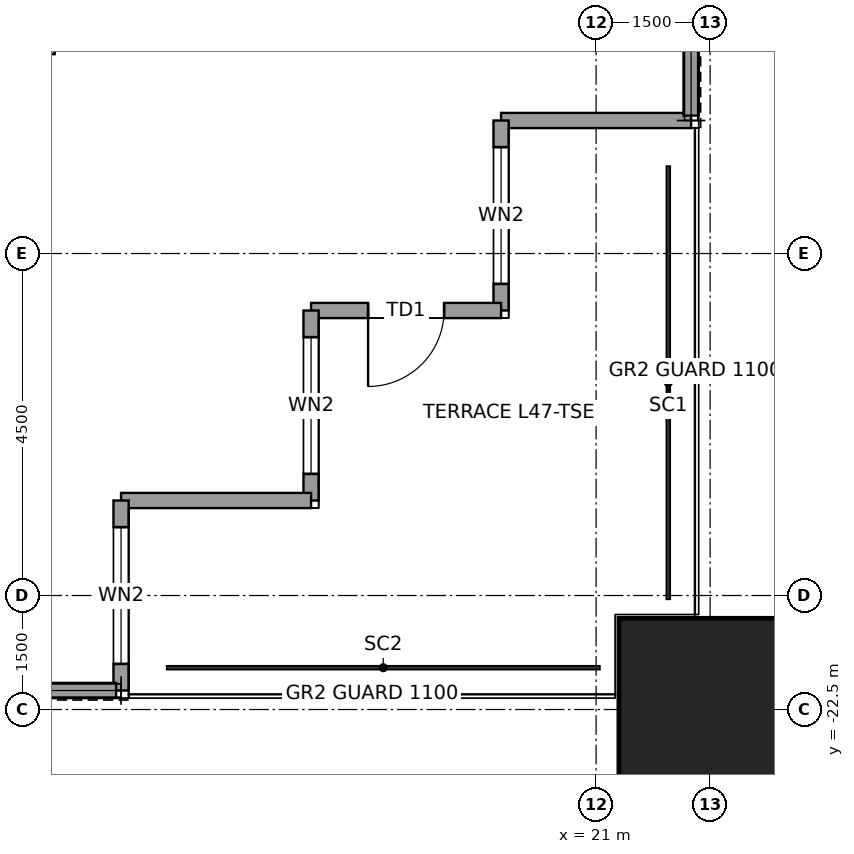
"""IFC4 building model, lengths in metres.
Left out: names, types, materials, properties, quantities, classifications, styles, units other than length and angle.
Written with IfcOpenShell. Run it as: python <this file> out.ifc"""

import sys

from ifc_helpers import new_model, si_unit, direction, frame, frame_2d, origin, origin_2d, place, context, subcontext, project, spatial, rectangle, hollow_rectangle, extrude, element, fill, save


model = new_model("IFC4")
c1 = context("Model", 3, precision=1e-05, world=origin(), true_north=direction((0.0, 1.0)))
c2 = subcontext(c1, "Body", "Model", "MODEL_VIEW")
j1 = project(units=[si_unit("LENGTHUNIT", "METRE"), si_unit("PLANEANGLEUNIT", "RADIAN")], contexts=[c1])
p1 = place(None, origin())
s1 = spatial("IfcSite", under=j1, at=p1, CompositionType="ELEMENT")
p2 = place(p1, origin())
s2 = spatial("IfcBuilding", under=s1, at=p2, CompositionType="ELEMENT")
p3 = place(p2, frame((0.0, 0.0, 221.9)))
s3 = spatial("IfcBuildingStorey", under=s2, at=p3, CompositionType="ELEMENT", Elevation=221.9)
p4 = place(p3, frame((22.5, -22.5, 0.0), z_axis=(0.0, 0.0, 1.0), x_axis=(1.0, 0.0, 0.0)))
e1 = element("IfcColumn", 1, at=p4, inside=s3, PredefinedType="COLUMN", context=c2, shape_type="SweptSolid", body=[
    extrude(hollow_rectangle(XDim=2.4, YDim=2.4, WallThickness=0.12, at=origin_2d()), origin(), (0.0, 0.0, 1.0), 4.0),
])
p5 = place(p3, frame((22.25, -14.75, 0.0), z_axis=(0.0, 0.0, 1.0), x_axis=(-1.0, 0.0, 0.0)))
e2 = element("IfcWall", 2, at=p5, inside=s3, PredefinedType="SOLIDWALL", context=c2, shape_type="SweptSolid", body=[
    extrude(rectangle(XDim=2.5, YDim=0.2, at=frame_2d((1.25, 0.0))), origin(), (0.0, 0.0, 1.0), 3.85),
])
p6 = place(p3, frame((19.75, -14.75, 0.0), z_axis=(0.0, 0.0, 1.0), x_axis=(0.0, -1.0, 0.0)))
e3 = element("IfcWall", 3, at=p6, inside=s3, PredefinedType="SOLIDWALL", context=c2, shape_type="SweptSolid", body=[
    extrude(rectangle(XDim=2.5, YDim=0.2, at=frame_2d((1.25, 0.0))), origin(), (0.0, 0.0, 1.0), 3.85),
])
p7 = place(p6, frame((0.35, 0.0, 0.3)))
e4 = element("IfcOpeningElement", 4, at=p7, cuts=e3, PredefinedType="OPENING", context=c2, shape_type="SweptSolid", body=[
    extrude(rectangle(XDim=1.8, YDim=2.4, at=frame_2d((0.9, 1.2))), frame((0.0, 0.11, 0.0), z_axis=(0.0, -1.0, 0.0), x_axis=(1.0, 0.0, 0.0)), (0.0, 0.0, 1.0), 0.22),
])
p8 = place(p3, frame((19.75, -17.25, 0.0), z_axis=(0.0, 0.0, 1.0), x_axis=(-1.0, 0.0, 0.0)))
e5 = element("IfcWall", 5, at=p8, inside=s3, PredefinedType="SOLIDWALL", context=c2, shape_type="SweptSolid", body=[
    extrude(rectangle(XDim=2.5, YDim=0.2, at=frame_2d((1.25, 0.0))), origin(), (0.0, 0.0, 1.0), 3.85),
])
p9 = place(p8, frame((0.75, 0.0, 0.0)))
e6 = element("IfcOpeningElement", 6, at=p9, cuts=e5, PredefinedType="OPENING", context=c2, shape_type="SweptSolid", body=[
    extrude(rectangle(XDim=1.0, YDim=2.4, at=frame_2d((0.5, 1.2))), frame((0.0, 0.11, 0.0), z_axis=(0.0, -1.0, 0.0), x_axis=(1.0, 0.0, 0.0)), (0.0, 0.0, 1.0), 0.22),
])
p10 = place(p3, frame((17.25, -17.25, 0.0), z_axis=(0.0, 0.0, 1.0), x_axis=(0.0, -1.0, 0.0)))
e7 = element("IfcWall", 7, at=p10, inside=s3, PredefinedType="SOLIDWALL", context=c2, shape_type="SweptSolid", body=[
    extrude(rectangle(XDim=2.5, YDim=0.2, at=frame_2d((1.25, 0.0))), origin(), (0.0, 0.0, 1.0), 3.85),
])
p11 = place(p10, frame((0.35, 0.0, 0.3)))
e8 = element("IfcOpeningElement", 8, at=p11, cuts=e7, PredefinedType="OPENING", context=c2, shape_type="SweptSolid", body=[
    extrude(rectangle(XDim=1.8, YDim=2.4, at=frame_2d((0.9, 1.2))), frame((0.0, 0.11, 0.0), z_axis=(0.0, -1.0, 0.0), x_axis=(1.0, 0.0, 0.0)), (0.0, 0.0, 1.0), 0.22),
])
p12 = place(p3, frame((17.25, -19.75, 0.0), z_axis=(0.0, 0.0, 1.0), x_axis=(-1.0, 0.0, 0.0)))
e9 = element("IfcWall", 9, at=p12, inside=s3, PredefinedType="SOLIDWALL", context=c2, shape_type="SweptSolid", body=[
    extrude(rectangle(XDim=2.5, YDim=0.2, at=frame_2d((1.25, 0.0))), origin(), (0.0, 0.0, 1.0), 3.85),
])
p13 = place(p3, frame((14.75, -19.75, 0.0), z_axis=(0.0, 0.0, 1.0), x_axis=(0.0, -1.0, 0.0)))
e10 = element("IfcWall", 10, at=p13, inside=s3, PredefinedType="SOLIDWALL", context=c2, shape_type="SweptSolid", body=[
    extrude(rectangle(XDim=2.5, YDim=0.2, at=frame_2d((1.25, 0.0))), origin(), (0.0, 0.0, 1.0), 3.85),
])
p14 = place(p13, frame((0.35, 0.0, 0.3)))
e11 = element("IfcOpeningElement", 11, at=p14, cuts=e10, PredefinedType="OPENING", context=c2, shape_type="SweptSolid", body=[
    extrude(rectangle(XDim=1.8, YDim=2.4, at=frame_2d((0.9, 1.2))), frame((0.0, 0.11, 0.0), z_axis=(0.0, -1.0, 0.0), x_axis=(1.0, 0.0, 0.0)), (0.0, 0.0, 1.0), 0.22),
])
for number, where, z_axis, x_axis in (
    (12, (22.25, -12.366, 0.0), (0.0, 0.0, 1.0), (0.0, -1.0, 0.0)),
    (13, (14.685, -22.25, 0.0), (0.0, 0.0, 1.0), (-1.0, 0.0, 0.0)),
):
    element("IfcWall", number, at=place(p3, frame(where, z_axis=z_axis, x_axis=x_axis)), inside=s3, PredefinedType="SOLIDWALL", context=c2, shape_type="SweptSolid", body=[
        extrude(rectangle(XDim=2.319, YDim=0.2, at=frame_2d((1.16, 0.0))), origin(), (0.0, 0.0, 1.0), 3.85),
    ])
p15 = place(p3, frame((-0.075, -13.8, 0.0), z_axis=(0.0, 0.0, 1.0), x_axis=(1.0, 0.0, 0.0)))
e14 = element("IfcWall", 14, at=p15, inside=s3, PredefinedType="PARTITIONING", context=c2, shape_type="SweptSolid", body=[
    extrude(rectangle(XDim=13.95, YDim=0.15, at=frame_2d((6.975, 0.0))), origin(), (0.0, 0.0, 1.0), 3.85),
])
p16 = place(p15, frame((5.475, 0.0, 0.0)))
e15 = element("IfcOpeningElement", 15, at=p16, cuts=e14, PredefinedType="OPENING", context=c2, shape_type="SweptSolid", body=[
    extrude(rectangle(XDim=1.0, YDim=2.4, at=frame_2d((0.5, 1.2))), frame((0.0, 0.085, 0.0), z_axis=(0.0, -1.0, 0.0), x_axis=(1.0, 0.0, 0.0)), (0.0, 0.0, 1.0), 0.17),
])
p17 = place(p3, frame((13.8, -13.875, 0.0), z_axis=(0.0, 0.0, 1.0), x_axis=(0.0, 1.0, 0.0)))
e16 = element("IfcWall", 16, at=p17, inside=s3, PredefinedType="PARTITIONING", context=c2, shape_type="SweptSolid", body=[
    extrude(rectangle(XDim=13.95, YDim=0.15, at=frame_2d((6.975, 0.0))), origin(), (0.0, 0.0, 1.0), 3.85),
])
p18 = place(p7, origin())
e17 = element("IfcWindow", 17, at=p18, inside=s3, PartitioningType="SINGLE_PANEL", PredefinedType="WINDOW", context=c2, shape_type="SweptSolid", body=[
    extrude(rectangle(XDim=1.8, YDim=2.4, at=frame_2d((0.9, 1.2))), frame((0.0, 0.03, 0.0), z_axis=(0.0, -1.0, 0.0), x_axis=(1.0, 0.0, 0.0)), (0.0, 0.0, 1.0), 0.06),
])
fill(e4, e17)
p19 = place(p9, origin())
e18 = element("IfcDoor", 18, at=p19, inside=s3, OperationType="SINGLE_SWING_RIGHT", PredefinedType="DOOR", context=c2, shape_type="SweptSolid", body=[
    extrude(rectangle(XDim=1.0, YDim=2.4, at=frame_2d((0.5, 1.2))), frame((0.0, 0.025, 0.0), z_axis=(0.0, -1.0, 0.0), x_axis=(1.0, 0.0, 0.0)), (0.0, 0.0, 1.0), 0.05),
])
fill(e6, e18)
p20 = place(p11, origin())
e19 = element("IfcWindow", 19, at=p20, inside=s3, PartitioningType="SINGLE_PANEL", PredefinedType="WINDOW", context=c2, shape_type="SweptSolid", body=[
    extrude(rectangle(XDim=1.8, YDim=2.4, at=frame_2d((0.9, 1.2))), frame((0.0, 0.03, 0.0), z_axis=(0.0, -1.0, 0.0), x_axis=(1.0, 0.0, 0.0)), (0.0, 0.0, 1.0), 0.06),
])
fill(e8, e19)
p21 = place(p14, origin())
e20 = element("IfcWindow", 20, at=p21, inside=s3, PartitioningType="SINGLE_PANEL", PredefinedType="WINDOW", context=c2, shape_type="SweptSolid", body=[
    extrude(rectangle(XDim=1.8, YDim=2.4, at=frame_2d((0.9, 1.2))), frame((0.0, 0.03, 0.0), z_axis=(0.0, -1.0, 0.0), x_axis=(1.0, 0.0, 0.0)), (0.0, 0.0, 1.0), 0.06),
])
fill(e11, e20)
save(model, sys.argv[1])
